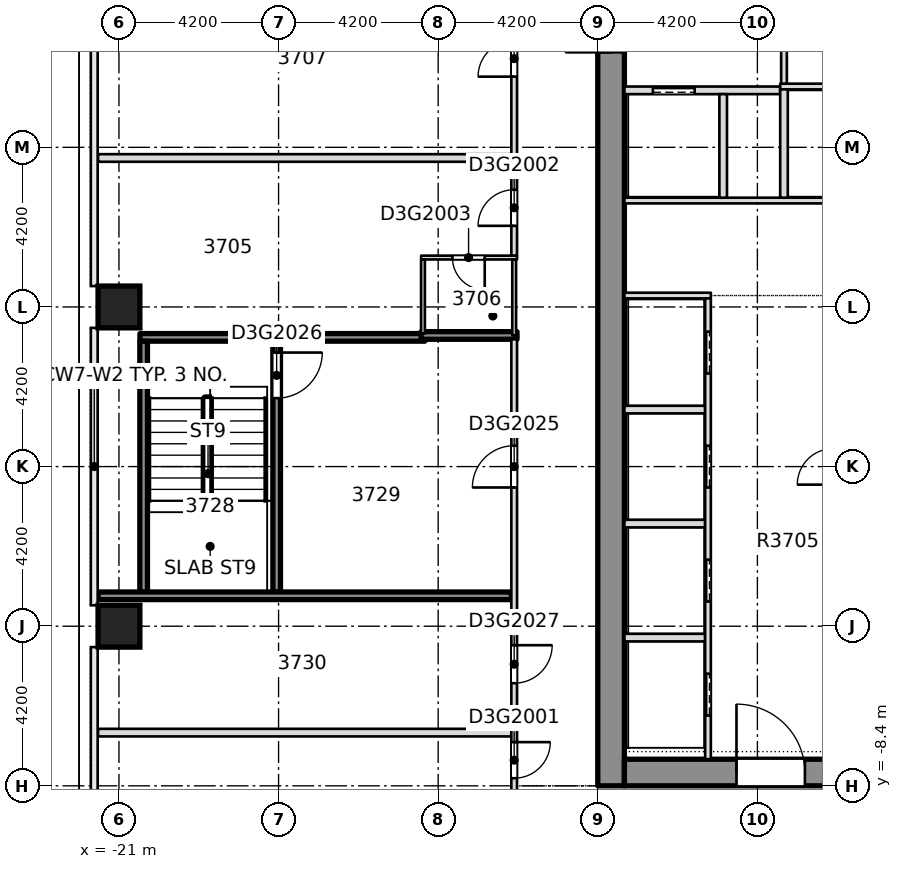
"""IFC4 building model, lengths in metres.
Left out: names, types, materials, properties, quantities, classifications, styles, units other than length and angle.
Written with IfcOpenShell. Run it as: python <this file> out.ifc"""

import sys

from ifc_helpers import new_model, si_unit, direction, frame, frame_2d, origin, origin_2d, place, context, subcontext, project, spatial, rectangle, extrude, element, fill, save


model = new_model("IFC4")
c1 = context("Model", 3, precision=1e-05, world=origin(), true_north=direction((0.0, 1.0)))
c2 = subcontext(c1, "Body", "Model", "MODEL_VIEW")
j1 = project(units=[si_unit("LENGTHUNIT", "METRE"), si_unit("PLANEANGLEUNIT", "RADIAN")], contexts=[c1])
p1 = place(None, origin())
s1 = spatial("IfcSite", under=j1, at=p1, CompositionType="ELEMENT")
p2 = place(p1, origin())
s2 = spatial("IfcBuilding", under=s1, at=p2, CompositionType="ELEMENT")
p3 = place(p2, frame((0.0, 0.0, 146.9)))
s3 = spatial("IfcBuildingStorey", under=s2, at=p3, CompositionType="ELEMENT", Elevation=146.9)
p4 = place(p3, frame((-8.05, -8.4, -0.4), z_axis=(0.0, 0.0, 1.0), x_axis=(0.0, 1.0, 0.0)))
e1 = element("IfcWall", 1, at=p4, inside=s3, PredefinedType="SOLIDWALL", context=c2, shape_type="SweptSolid", body=[
    extrude(rectangle(XDim=30.15, YDim=0.7, at=frame_2d((15.075, 0.0))), origin(), (0.0, 0.0, 1.0), 3.45),
])
p5 = place(p4, frame((19.3, 0.0, 0.4)))
e2 = element("IfcOpeningElement", 2, at=p5, cuts=e1, PredefinedType="OPENING", context=c2, shape_type="SweptSolid", body=[
    extrude(rectangle(XDim=1.2, YDim=2.1, at=frame_2d((0.6, 1.05))), frame((0.0, 0.36, 0.0), z_axis=(0.0, -1.0, 0.0), x_axis=(1.0, 0.0, 0.0)), (0.0, 0.0, 1.0), 0.72),
])
p6 = place(p3, frame((-7.7, -8.05, -0.4), z_axis=(0.0, 0.0, 1.0), x_axis=(1.0, 0.0, 0.0)))
e3 = element("IfcWall", 3, at=p6, inside=s3, PredefinedType="SHEAR", context=c2, shape_type="SweptSolid", body=[
    extrude(rectangle(XDim=15.4, YDim=0.7, at=frame_2d((7.7, 0.0))), origin(), (0.0, 0.0, 1.0), 3.45),
])
p7 = place(p6, frame((2.95, 0.0, 0.4)))
e4 = element("IfcOpeningElement", 4, at=p7, cuts=e3, PredefinedType="OPENING", context=c2, shape_type="SweptSolid", body=[
    extrude(rectangle(XDim=1.8, YDim=2.1, at=frame_2d((0.9, 1.05))), frame((0.0, 0.36, 0.0), z_axis=(0.0, -1.0, 0.0), x_axis=(1.0, 0.0, 0.0)), (0.0, 0.0, 1.0), 0.72),
])
p8 = place(p6, frame((10.65, 0.0, 0.4)))
e5 = element("IfcOpeningElement", 5, at=p8, cuts=e3, PredefinedType="OPENING", context=c2, shape_type="SweptSolid", body=[
    extrude(rectangle(XDim=1.8, YDim=2.1, at=frame_2d((0.9, 1.05))), frame((0.0, 0.36, 0.0), z_axis=(0.0, -1.0, 0.0), x_axis=(1.0, 0.0, 0.0)), (0.0, 0.0, 1.0), 0.72),
])
for number, where, z_axis, x_axis in (
    (6, (-21.0, -4.2, -0.4), (0.0, 0.0, 1.0), (1.0, 0.0, 0.0)),
    (7, (-21.0, 4.2, -0.4), (0.0, 0.0, 1.0), (1.0, 0.0, 0.0)),
):
    element("IfcColumn", number, at=place(p3, frame(where, z_axis=z_axis, x_axis=x_axis)), inside=s3, PredefinedType="COLUMN", context=c2, shape_type="SweptSolid", body=[
        extrude(rectangle(XDim=1.1, YDim=1.1, at=origin_2d()), origin(), (0.0, 0.0, 1.0), 3.45),
    ])
p9 = place(p3, frame((-21.55, -7.0, 0.0), z_axis=(0.0, 0.0, 1.0), x_axis=(1.0, 0.0, 0.0)))
e8 = element("IfcWall", 8, at=p9, inside=s3, PredefinedType="PARTITIONING", context=c2, shape_type="SweptSolid", body=[
    extrude(rectangle(XDim=10.875, YDim=0.2, at=frame_2d((5.438, 0.0))), origin(), (0.0, 0.0, 1.0), 3.05),
])
p10 = place(p3, frame((-20.448, 3.4, 0.0), z_axis=(0.0, 0.0, 1.0), x_axis=(1.0, 0.0, 0.0)))
e9 = element("IfcWall", 9, at=p10, inside=s3, PredefinedType="SOLIDWALL", context=c2, shape_type="SweptSolid", body=[
    extrude(rectangle(XDim=7.498, YDim=0.2, at=frame_2d((3.749, 0.0))), origin(), (0.0, 0.0, 1.0), 3.05),
])
p11 = place(p3, frame((-13.05, 3.45, 0.0), z_axis=(0.0, 0.0, 1.0), x_axis=(1.0, 0.0, 0.0)))
e10 = element("IfcWall", 10, at=p11, inside=s3, PredefinedType="SOLIDWALL", context=c2, shape_type="SweptSolid", body=[
    extrude(rectangle(XDim=2.525, YDim=0.2, at=frame_2d((1.263, 0.0))), origin(), (0.0, 0.0, 1.0), 3.05),
])
p12 = place(p3, frame((-13.048, 5.5, 0.0), z_axis=(0.0, 0.0, 1.0), x_axis=(1.0, 0.0, 0.0)))
e11 = element("IfcWall", 11, at=p12, inside=s3, PredefinedType="PARTITIONING", context=c2, shape_type="SweptSolid", body=[
    extrude(rectangle(XDim=2.523, YDim=0.1, at=frame_2d((1.262, 0.0))), origin(), (0.0, 0.0, 1.0), 3.05),
])
p13 = place(p12, frame((0.823, 0.0, 0.0)))
e12 = element("IfcOpeningElement", 12, at=p13, cuts=e11, PredefinedType="OPENING", context=c2, shape_type="SweptSolid", body=[
    extrude(rectangle(XDim=0.85, YDim=2.1, at=frame_2d((0.425, 1.05))), frame((0.0, 0.06, 0.0), z_axis=(0.0, -1.0, 0.0), x_axis=(1.0, 0.0, 0.0)), (0.0, 0.0, 1.0), 0.12),
])
p14 = place(p3, frame((-21.55, 8.12, 0.0), z_axis=(0.0, 0.0, 1.0), x_axis=(1.0, 0.0, 0.0)))
e13 = element("IfcWall", 13, at=p14, inside=s3, PredefinedType="PARTITIONING", context=c2, shape_type="SweptSolid", body=[
    extrude(rectangle(XDim=10.875, YDim=0.2, at=frame_2d((5.438, 0.0))), origin(), (0.0, 0.0, 1.0), 3.05),
])
p15 = place(p3, frame((-20.35, -3.298, 0.0), z_axis=(0.0, 0.0, 1.0), x_axis=(0.0, 1.0, 0.0)))
e14 = element("IfcWall", 14, at=p15, inside=s3, PredefinedType="SOLIDWALL", context=c2, shape_type="SweptSolid", body=[
    extrude(rectangle(XDim=6.596, YDim=0.2, at=frame_2d((3.298, 0.0))), origin(), (0.0, 0.0, 1.0), 3.05),
])
p16 = place(p3, frame((-16.85, -3.3, 0.0), z_axis=(0.0, 0.0, 1.0), x_axis=(0.0, 1.0, 0.0)))
e15 = element("IfcWall", 15, at=p16, inside=s3, PredefinedType="SOLIDWALL", context=c2, shape_type="SweptSolid", body=[
    extrude(rectangle(XDim=6.6, YDim=0.2, at=frame_2d((3.3, 0.0))), origin(), (0.0, 0.0, 1.0), 3.05),
])
p17 = place(p16, frame((5.1, 0.0, 0.0)))
e16 = element("IfcOpeningElement", 16, at=p17, cuts=e15, PredefinedType="OPENING", context=c2, shape_type="SweptSolid", body=[
    extrude(rectangle(XDim=1.2, YDim=2.1, at=frame_2d((0.6, 1.05))), frame((0.0, 0.11, 0.0), z_axis=(0.0, -1.0, 0.0), x_axis=(1.0, 0.0, 0.0)), (0.0, 0.0, 1.0), 0.22),
])
p18 = place(p3, frame((-13.0, 3.5, 0.0), z_axis=(0.0, 0.0, 1.0), x_axis=(0.0, 1.0, 0.0)))
e17 = element("IfcWall", 17, at=p18, inside=s3, PredefinedType="PARTITIONING", context=c2, shape_type="SweptSolid", body=[
    extrude(rectangle(XDim=1.948, YDim=0.1, at=frame_2d((0.974, 0.0))), origin(), (0.0, 0.0, 1.0), 3.05),
])
p19 = place(p3, frame((-10.6, -10.525, 0.0), z_axis=(0.0, 0.0, 1.0), x_axis=(0.0, 1.0, 0.0)))
e18 = element("IfcWall", 18, at=p19, inside=s3, PredefinedType="PARTITIONING", context=c2, shape_type="SweptSolid", body=[
    extrude(rectangle(XDim=13.875, YDim=0.15, at=frame_2d((6.938, 0.0))), origin(), (0.0, 0.0, 1.0), 3.05),
])
p20 = place(p19, frame((2.325, 0.0, 0.0)))
e19 = element("IfcOpeningElement", 19, at=p20, cuts=e18, PredefinedType="OPENING", context=c2, shape_type="SweptSolid", body=[
    extrude(rectangle(XDim=0.95, YDim=2.1, at=frame_2d((0.475, 1.05))), frame((0.0, 0.085, 0.0), z_axis=(0.0, -1.0, 0.0), x_axis=(1.0, 0.0, 0.0)), (0.0, 0.0, 1.0), 0.17),
])
p21 = place(p19, frame((9.975, 0.0, 0.0)))
e20 = element("IfcOpeningElement", 20, at=p21, cuts=e18, PredefinedType="OPENING", context=c2, shape_type="SweptSolid", body=[
    extrude(rectangle(XDim=1.1, YDim=2.1, at=frame_2d((0.55, 1.05))), frame((0.0, 0.085, 0.0), z_axis=(0.0, -1.0, 0.0), x_axis=(1.0, 0.0, 0.0)), (0.0, 0.0, 1.0), 0.17),
])
p22 = place(p19, frame((4.825, 0.0, 0.0)))
e21 = element("IfcOpeningElement", 21, at=p22, cuts=e18, PredefinedType="OPENING", context=c2, shape_type="SweptSolid", body=[
    extrude(rectangle(XDim=1.0, YDim=2.1, at=frame_2d((0.5, 1.05))), frame((0.0, 0.085, 0.0), z_axis=(0.0, -1.0, 0.0), x_axis=(1.0, 0.0, 0.0)), (0.0, 0.0, 1.0), 0.17),
])
p23 = place(p3, frame((-10.6, 3.45, 0.0), z_axis=(0.0, 0.0, 1.0), x_axis=(0.0, 1.0, 0.0)))
e22 = element("IfcWall", 22, at=p23, inside=s3, PredefinedType="PARTITIONING", context=c2, shape_type="SweptSolid", body=[
    extrude(rectangle(XDim=2.0, YDim=0.1, at=frame_2d((1.0, 0.0))), origin(), (0.0, 0.0, 1.0), 3.05),
])
p24 = place(p3, frame((-10.6, 5.55, 0.0), z_axis=(0.0, 0.0, 1.0), x_axis=(0.0, 1.0, 0.0)))
e23 = element("IfcWall", 23, at=p24, inside=s3, PredefinedType="PARTITIONING", context=c2, shape_type="SweptSolid", body=[
    extrude(rectangle(XDim=7.75, YDim=0.15, at=frame_2d((3.875, 0.0))), origin(), (0.0, 0.0, 1.0), 3.05),
])
p25 = place(p24, frame((0.785, 0.0, 0.0)))
e24 = element("IfcOpeningElement", 24, at=p25, cuts=e23, PredefinedType="OPENING", context=c2, shape_type="SweptSolid", body=[
    extrude(rectangle(XDim=0.95, YDim=2.1, at=frame_2d((0.475, 1.05))), frame((0.0, 0.085, 0.0), z_axis=(0.0, -1.0, 0.0), x_axis=(1.0, 0.0, 0.0)), (0.0, 0.0, 1.0), 0.17),
])
p26 = place(p24, frame((4.71, 0.0, 0.0)))
e25 = element("IfcOpeningElement", 25, at=p26, cuts=e23, PredefinedType="OPENING", context=c2, shape_type="SweptSolid", body=[
    extrude(rectangle(XDim=0.95, YDim=2.1, at=frame_2d((0.475, 1.05))), frame((0.0, 0.085, 0.0), z_axis=(0.0, -1.0, 0.0), x_axis=(1.0, 0.0, 0.0)), (0.0, 0.0, 1.0), 0.17),
])
for number, where, z_axis, x_axis in (
    (26, (-7.699, -4.5, 0.0), (0.0, 0.0, 1.0), (1.0, 0.0, 0.0)),
    (27, (-7.699, -1.5, 0.0), (0.0, 0.0, 1.0), (1.0, 0.0, 0.0)),
    (28, (-7.699, 1.5, 0.0), (0.0, 0.0, 1.0), (1.0, 0.0, 0.0)),
):
    element("IfcWall", number, at=place(p3, frame(where, z_axis=z_axis, x_axis=x_axis)), inside=s3, PredefinedType="PARTITIONING", context=c2, shape_type="SweptSolid", body=[
        extrude(rectangle(XDim=2.124, YDim=0.2, at=frame_2d((1.062, 0.0))), origin(), (0.0, 0.0, 1.0), 3.05),
    ])
p27 = place(p3, frame((-7.699, 4.5, 0.0), z_axis=(0.0, 0.0, 1.0), x_axis=(1.0, 0.0, 0.0)))
e29 = element("IfcWall", 29, at=p27, inside=s3, PredefinedType="PARTITIONING", context=c2, shape_type="SweptSolid", body=[
    extrude(rectangle(XDim=2.274, YDim=0.15, at=frame_2d((1.137, 0.0))), origin(), (0.0, 0.0, 1.0), 3.05),
])
p28 = place(p3, frame((-7.699, 7.0, 0.0), z_axis=(0.0, 0.0, 1.0), x_axis=(1.0, 0.0, 0.0)))
e30 = element("IfcWall", 30, at=p28, inside=s3, PredefinedType="PARTITIONING", context=c2, shape_type="SweptSolid", body=[
    extrude(rectangle(XDim=15.398, YDim=0.15, at=frame_2d((7.699, 0.0))), origin(), (0.0, 0.0, 1.0), 3.05),
])
p29 = place(p28, frame((6.999, 0.0, 0.0)))
e31 = element("IfcOpeningElement", 31, at=p29, cuts=e30, PredefinedType="OPENING", context=c2, shape_type="SweptSolid", body=[
    extrude(rectangle(XDim=1.4, YDim=2.1, at=frame_2d((0.7, 1.05))), frame((0.0, 0.085, 0.0), z_axis=(0.0, -1.0, 0.0), x_axis=(1.0, 0.0, 0.0)), (0.0, 0.0, 1.0), 0.17),
])
p30 = place(p3, frame((-7.699, 9.9, 0.0), z_axis=(0.0, 0.0, 1.0), x_axis=(1.0, 0.0, 0.0)))
e32 = element("IfcWall", 32, at=p30, inside=s3, PredefinedType="PARTITIONING", context=c2, shape_type="SweptSolid", body=[
    extrude(rectangle(XDim=4.099, YDim=0.2, at=frame_2d((2.049, 0.0))), origin(), (0.0, 0.0, 1.0), 3.05),
])
p31 = place(p30, frame((0.749, 0.0, 0.0)))
e33 = element("IfcOpeningElement", 33, at=p31, cuts=e32, PredefinedType="OPENING", context=c2, shape_type="SweptSolid", body=[
    extrude(rectangle(XDim=1.1, YDim=2.1, at=frame_2d((0.55, 1.05))), frame((0.0, 0.11, 0.0), z_axis=(0.0, -1.0, 0.0), x_axis=(1.0, 0.0, 0.0)), (0.0, 0.0, 1.0), 0.22),
])
p32 = place(p3, frame((-3.6, 10.0, 0.0), z_axis=(0.0, 0.0, 1.0), x_axis=(1.0, 0.0, 0.0)))
e34 = element("IfcWall", 34, at=p32, inside=s3, PredefinedType="PARTITIONING", context=c2, shape_type="SweptSolid", body=[
    extrude(rectangle(XDim=7.2, YDim=0.15, at=frame_2d((3.6, 0.0))), origin(), (0.0, 0.0, 1.0), 3.05),
])
p33 = place(p32, frame((2.9, 0.0, 0.0)))
e35 = element("IfcOpeningElement", 35, at=p33, cuts=e34, PredefinedType="OPENING", context=c2, shape_type="SweptSolid", body=[
    extrude(rectangle(XDim=1.4, YDim=2.1, at=frame_2d((0.7, 1.05))), frame((0.0, 0.085, 0.0), z_axis=(0.0, -1.0, 0.0), x_axis=(1.0, 0.0, 0.0)), (0.0, 0.0, 1.0), 0.17),
])
p34 = place(p3, frame((-5.5, -7.699, 0.0), z_axis=(0.0, 0.0, 1.0), x_axis=(0.0, 1.0, 0.0)))
e36 = element("IfcWall", 36, at=p34, inside=s3, PredefinedType="PARTITIONING", context=c2, shape_type="SweptSolid", body=[
    extrude(rectangle(XDim=12.124, YDim=0.15, at=frame_2d((6.062, 0.0))), origin(), (0.0, 0.0, 1.0), 3.05),
])
p35 = place(p34, frame((1.149, 0.0, 0.0)))
e37 = element("IfcOpeningElement", 37, at=p35, cuts=e36, PredefinedType="OPENING", context=c2, shape_type="SweptSolid", body=[
    extrude(rectangle(XDim=1.1, YDim=2.1, at=frame_2d((0.55, 1.05))), frame((0.0, 0.085, 0.0), z_axis=(0.0, -1.0, 0.0), x_axis=(1.0, 0.0, 0.0)), (0.0, 0.0, 1.0), 0.17),
])
p36 = place(p34, frame((4.149, 0.0, 0.0)))
e38 = element("IfcOpeningElement", 38, at=p36, cuts=e36, PredefinedType="OPENING", context=c2, shape_type="SweptSolid", body=[
    extrude(rectangle(XDim=1.1, YDim=2.1, at=frame_2d((0.55, 1.05))), frame((0.0, 0.085, 0.0), z_axis=(0.0, -1.0, 0.0), x_axis=(1.0, 0.0, 0.0)), (0.0, 0.0, 1.0), 0.17),
])
p37 = place(p34, frame((7.149, 0.0, 0.0)))
e39 = element("IfcOpeningElement", 39, at=p37, cuts=e36, PredefinedType="OPENING", context=c2, shape_type="SweptSolid", body=[
    extrude(rectangle(XDim=1.1, YDim=2.1, at=frame_2d((0.55, 1.05))), frame((0.0, 0.085, 0.0), z_axis=(0.0, -1.0, 0.0), x_axis=(1.0, 0.0, 0.0)), (0.0, 0.0, 1.0), 0.17),
])
p38 = place(p34, frame((10.149, 0.0, 0.0)))
e40 = element("IfcOpeningElement", 40, at=p38, cuts=e36, PredefinedType="OPENING", context=c2, shape_type="SweptSolid", body=[
    extrude(rectangle(XDim=1.1, YDim=2.1, at=frame_2d((0.55, 1.05))), frame((0.0, 0.085, 0.0), z_axis=(0.0, -1.0, 0.0), x_axis=(1.0, 0.0, 0.0)), (0.0, 0.0, 1.0), 0.17),
])
p39 = place(p3, frame((-5.1, 7.075, 0.0), z_axis=(0.0, 0.0, 1.0), x_axis=(0.0, 1.0, 0.0)))
e41 = element("IfcWall", 41, at=p39, inside=s3, PredefinedType="PARTITIONING", context=c2, shape_type="SweptSolid", body=[
    extrude(rectangle(XDim=2.725, YDim=0.2, at=frame_2d((1.363, 0.0))), origin(), (0.0, 0.0, 1.0), 3.05),
])
p40 = place(p3, frame((-3.5, 7.075, 0.0), z_axis=(0.0, 0.0, 1.0), x_axis=(0.0, 1.0, 0.0)))
e42 = element("IfcWall", 42, at=p40, inside=s3, PredefinedType="PARTITIONING", context=c2, shape_type="SweptSolid", body=[
    extrude(rectangle(XDim=2.85, YDim=0.2, at=frame_2d((1.425, 0.0))), origin(), (0.0, 0.0, 1.0), 3.05),
])
p41 = place(p3, frame((-3.5, 10.075, 0.0), z_axis=(0.0, 0.0, 1.0), x_axis=(0.0, 1.0, 0.0)))
e43 = element("IfcWall", 43, at=p41, inside=s3, PredefinedType="PARTITIONING", context=c2, shape_type="SweptSolid", body=[
    extrude(rectangle(XDim=3.075, YDim=0.15, at=frame_2d((1.538, 0.0))), origin(), (0.0, 0.0, 1.0), 3.05),
])
p42 = place(p41, frame((0.925, 0.0, 0.0)))
e44 = element("IfcOpeningElement", 44, at=p42, cuts=e43, PredefinedType="OPENING", context=c2, shape_type="SweptSolid", body=[
    extrude(rectangle(XDim=1.2, YDim=2.1, at=frame_2d((0.6, 1.05))), frame((0.0, 0.085, 0.0), z_axis=(0.0, -1.0, 0.0), x_axis=(1.0, 0.0, 0.0)), (0.0, 0.0, 1.0), 0.17),
])
p43 = place(p3, frame((-21.55, -3.4, 0.0), z_axis=(0.0, 0.0, 1.0), x_axis=(1.0, 0.0, 0.0)))
e45 = element("IfcWall", 45, at=p43, inside=s3, PredefinedType="SOLIDWALL", context=c2, shape_type="SweptSolid", body=[
    extrude(rectangle(XDim=10.875, YDim=0.2, at=frame_2d((5.438, 0.0))), origin(), (0.0, 0.0, 1.0), 3.05),
])
p44 = place(p20, origin())
e46 = element("IfcDoor", 46, at=p44, inside=s3, OperationType="SINGLE_SWING_RIGHT", PredefinedType="DOOR", context=c2, shape_type="SweptSolid", body=[
    extrude(rectangle(XDim=0.95, YDim=2.1, at=frame_2d((0.475, 1.05))), frame((0.0, 0.025, 0.0), z_axis=(0.0, -1.0, 0.0), x_axis=(1.0, 0.0, 0.0)), (0.0, 0.0, 1.0), 0.05),
])
fill(e19, e46)
p45 = place(p25, origin())
e47 = element("IfcDoor", 47, at=p45, inside=s3, OperationType="SINGLE_SWING_LEFT", PredefinedType="DOOR", context=c2, shape_type="SweptSolid", body=[
    extrude(rectangle(XDim=0.95, YDim=2.1, at=frame_2d((0.475, 1.05))), frame((0.0, 0.025, 0.0), z_axis=(0.0, -1.0, 0.0), x_axis=(1.0, 0.0, 0.0)), (0.0, 0.0, 1.0), 0.05),
])
fill(e24, e47)
p46 = place(p13, origin())
e48 = element("IfcDoor", 48, at=p46, inside=s3, OperationType="SINGLE_SWING_RIGHT", PredefinedType="DOOR", context=c2, shape_type="SweptSolid", body=[
    extrude(rectangle(XDim=0.85, YDim=2.1, at=frame_2d((0.425, 1.05))), frame((0.0, 0.025, 0.0), z_axis=(0.0, -1.0, 0.0), x_axis=(1.0, 0.0, 0.0)), (0.0, 0.0, 1.0), 0.05),
])
fill(e12, e48)
p47 = place(p26, origin())
e49 = element("IfcDoor", 49, at=p47, inside=s3, OperationType="SINGLE_SWING_RIGHT", PredefinedType="DOOR", context=c2, shape_type="SweptSolid", body=[
    extrude(rectangle(XDim=0.95, YDim=2.1, at=frame_2d((0.475, 1.05))), frame((0.0, 0.025, 0.0), z_axis=(0.0, -1.0, 0.0), x_axis=(1.0, 0.0, 0.0)), (0.0, 0.0, 1.0), 0.05),
])
fill(e25, e49)
p48 = place(p21, origin())
e50 = element("IfcDoor", 50, at=p48, inside=s3, OperationType="SINGLE_SWING_RIGHT", PredefinedType="DOOR", context=c2, shape_type="SweptSolid", body=[
    extrude(rectangle(XDim=1.1, YDim=2.1, at=frame_2d((0.55, 1.05))), frame((0.0, 0.025, 0.0), z_axis=(0.0, -1.0, 0.0), x_axis=(1.0, 0.0, 0.0)), (0.0, 0.0, 1.0), 0.05),
])
fill(e20, e50)
p49 = place(p17, origin())
e51 = element("IfcDoor", 51, at=p49, inside=s3, OperationType="SINGLE_SWING_RIGHT", PredefinedType="DOOR", context=c2, shape_type="SweptSolid", body=[
    extrude(rectangle(XDim=1.2, YDim=2.1, at=frame_2d((0.6, 1.05))), frame((0.0, 0.025, 0.0), z_axis=(0.0, -1.0, 0.0), x_axis=(1.0, 0.0, 0.0)), (0.0, 0.0, 1.0), 0.05),
])
fill(e16, e51)
p50 = place(p22, origin())
e52 = element("IfcDoor", 52, at=p50, inside=s3, OperationType="SINGLE_SWING_RIGHT", PredefinedType="DOOR", context=c2, shape_type="SweptSolid", body=[
    extrude(rectangle(XDim=1.0, YDim=2.1, at=frame_2d((0.5, 1.05))), frame((0.0, 0.025, 0.0), z_axis=(0.0, -1.0, 0.0), x_axis=(1.0, 0.0, 0.0)), (0.0, 0.0, 1.0), 0.05),
])
fill(e21, e52)
p51 = place(p35, origin())
e53 = element("IfcDoor", 53, at=p51, inside=s3, OperationType="SLIDING_TO_LEFT", PredefinedType="DOOR", context=c2, shape_type="SweptSolid", body=[
    extrude(rectangle(XDim=1.1, YDim=2.1, at=frame_2d((0.55, 1.05))), frame((0.0, 0.025, 0.0), z_axis=(0.0, -1.0, 0.0), x_axis=(1.0, 0.0, 0.0)), (0.0, 0.0, 1.0), 0.05),
])
fill(e37, e53)
p52 = place(p36, origin())
e54 = element("IfcDoor", 54, at=p52, inside=s3, OperationType="SLIDING_TO_LEFT", PredefinedType="DOOR", context=c2, shape_type="SweptSolid", body=[
    extrude(rectangle(XDim=1.1, YDim=2.1, at=frame_2d((0.55, 1.05))), frame((0.0, 0.025, 0.0), z_axis=(0.0, -1.0, 0.0), x_axis=(1.0, 0.0, 0.0)), (0.0, 0.0, 1.0), 0.05),
])
fill(e38, e54)
p53 = place(p37, origin())
e55 = element("IfcDoor", 55, at=p53, inside=s3, OperationType="SLIDING_TO_LEFT", PredefinedType="DOOR", context=c2, shape_type="SweptSolid", body=[
    extrude(rectangle(XDim=1.1, YDim=2.1, at=frame_2d((0.55, 1.05))), frame((0.0, 0.025, 0.0), z_axis=(0.0, -1.0, 0.0), x_axis=(1.0, 0.0, 0.0)), (0.0, 0.0, 1.0), 0.05),
])
fill(e39, e55)
p54 = place(p38, origin())
e56 = element("IfcDoor", 56, at=p54, inside=s3, OperationType="SLIDING_TO_LEFT", PredefinedType="DOOR", context=c2, shape_type="SweptSolid", body=[
    extrude(rectangle(XDim=1.1, YDim=2.1, at=frame_2d((0.55, 1.05))), frame((0.0, 0.025, 0.0), z_axis=(0.0, -1.0, 0.0), x_axis=(1.0, 0.0, 0.0)), (0.0, 0.0, 1.0), 0.05),
])
fill(e40, e56)
p55 = place(p31, origin())
e57 = element("IfcDoor", 57, at=p55, inside=s3, OperationType="SLIDING_TO_RIGHT", PredefinedType="DOOR", context=c2, shape_type="SweptSolid", body=[
    extrude(rectangle(XDim=1.1, YDim=2.1, at=frame_2d((0.55, 1.05))), frame((0.0, 0.025, 0.0), z_axis=(0.0, -1.0, 0.0), x_axis=(1.0, 0.0, 0.0)), (0.0, 0.0, 1.0), 0.05),
])
fill(e33, e57)
p56 = place(p7, origin())
e58 = element("IfcDoor", 58, at=p56, inside=s3, OperationType="SINGLE_SWING_LEFT", PredefinedType="DOOR", context=c2, shape_type="SweptSolid", body=[
    extrude(rectangle(XDim=1.8, YDim=2.1, at=frame_2d((0.9, 1.05))), frame((0.0, 0.025, 0.0), z_axis=(0.0, -1.0, 0.0), x_axis=(1.0, 0.0, 0.0)), (0.0, 0.0, 1.0), 0.05),
])
fill(e4, e58)
save(model, sys.argv[1])
